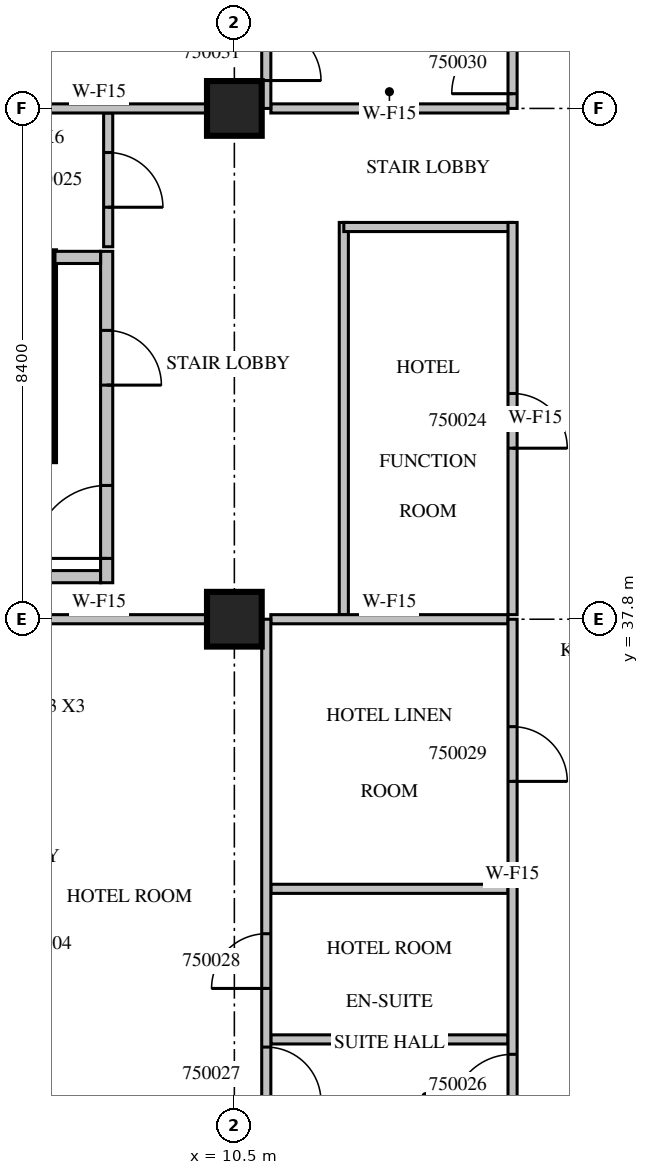
"""IFC4 building model, lengths in metres.
Left out: names, types, materials, properties, quantities, classifications, styles, units other than length and angle.
Written with IfcOpenShell. Run it as: python <this file> out.ifc"""

import sys

from ifc_helpers import new_model, si_unit, direction, frame, frame_2d, origin, origin_2d, place, context, subcontext, project, spatial, rectangle, extrude, source, transform, mapped, element, fill, save


model = new_model("IFC4")
c1 = context("Model", 3, precision=1e-05, world=origin(), true_north=direction((0.0, 1.0)))
c2 = subcontext(c1, "Body", "Model", "MODEL_VIEW")
j1 = project(units=[si_unit("LENGTHUNIT", "METRE"), si_unit("PLANEANGLEUNIT", "RADIAN")], contexts=[c1])
p1 = place(None, origin())
s1 = spatial("IfcSite", under=j1, at=p1, CompositionType="ELEMENT")
p2 = place(p1, origin())
s2 = spatial("IfcBuilding", under=s1, at=p2, CompositionType="ELEMENT")
p3 = place(p2, frame((0.0, 0.0, 223.4)))
s3 = spatial("IfcBuildingStorey", under=s2, at=p3, CompositionType="ELEMENT", Elevation=223.4)
m1 = source(origin(), c2, "Body", "SweptSolid", [
    extrude(rectangle(XDim=0.9, YDim=0.9, at=origin_2d()), origin(), (0.0, 0.0, 1.0), 3.8),
])
for number, where, z_axis, x_axis in (
    (1, (10.5, 37.8, 0.0), (0.0, 0.0, 1.0), (1.0, 0.0, 0.0)),
    (2, (10.5, 46.2, 0.0), (0.0, 0.0, 1.0), (1.0, 0.0, 0.0)),
):
    element("IfcColumn", number, at=place(p3, frame(where, z_axis=z_axis, x_axis=x_axis)), inside=s3, PredefinedType="COLUMN", context=c2, shape_type="MappedRepresentation", body=[
        mapped(m1, transform((0.0, 0.0, 0.0), scale=1.0)),
    ])
m2 = source(origin(), c2, "Body", "SweptSolid", [
    extrude(rectangle(XDim=3.45, YDim=0.25, at=frame_2d((1.725, 0.0))), origin(), (0.0, 0.0, 1.0), 3.4),
])
p4 = place(p3, frame((7.425, 40.4, 0.0), z_axis=(0.0, 0.0, 1.0), x_axis=(0.0, 1.0, 0.0)))
e3 = element("IfcWall", 3, at=p4, inside=s3, PredefinedType="SOLIDWALL", context=c2, shape_type="MappedRepresentation", body=[
    mapped(m2, transform((0.0, 0.0, 0.0), scale=1.0)),
])
m3 = source(origin(), c2, "Body", "SweptSolid", [
    extrude(rectangle(XDim=2.0, YDim=0.2, at=frame_2d((1.0, 0.0))), origin(), (0.0, 0.0, 1.0), 3.4),
])
p5 = place(p3, frame((6.3, 38.5, 0.0), z_axis=(0.0, 0.0, 1.0), x_axis=(1.0, 0.0, 0.0)))
e4 = element("IfcWall", 4, at=p5, inside=s3, PredefinedType="PARTITIONING", context=c2, shape_type="MappedRepresentation", body=[
    mapped(m3, transform((0.0, 0.0, 0.0), scale=1.0)),
])
m4 = source(origin(), c2, "Body", "SweptSolid", [
    extrude(rectangle(XDim=5.45, YDim=0.2, at=frame_2d((2.725, 0.0))), origin(), (0.0, 0.0, 1.0), 3.4),
])
p6 = place(p3, frame((8.4, 38.4, 0.0), z_axis=(0.0, 0.0, 1.0), x_axis=(0.0, 1.0, 0.0)))
e5 = element("IfcWall", 5, at=p6, inside=s3, PredefinedType="PARTITIONING", context=c2, shape_type="MappedRepresentation", body=[
    mapped(m4, transform((0.0, 0.0, 0.0), scale=1.0)),
])
m5 = source(origin(), c2, "Body", "SweptSolid", [
    extrude(rectangle(XDim=1.2, YDim=2.1, at=frame_2d((0.6, 1.05))), frame((0.0, 0.11, 0.0), z_axis=(0.0, -1.0, 0.0), x_axis=(1.0, 0.0, 0.0)), (0.0, 0.0, 1.0), 0.22),
])
p7 = place(p6, frame((0.4, 0.0, 0.0)))
e6 = element("IfcOpeningElement", 6, at=p7, cuts=e5, PredefinedType="OPENING", context=c2, shape_type="MappedRepresentation", body=[
    mapped(m5, transform((0.0, 0.0, 0.0), scale=1.0)),
])
m6 = source(origin(), c2, "Body", "SweptSolid", [
    extrude(rectangle(XDim=0.9, YDim=2.1, at=frame_2d((0.45, 1.05))), frame((0.0, 0.11, 0.0), z_axis=(0.0, -1.0, 0.0), x_axis=(1.0, 0.0, 0.0)), (0.0, 0.0, 1.0), 0.22),
])
p8 = place(p6, frame((3.25, 0.0, 0.0)))
e7 = element("IfcOpeningElement", 7, at=p8, cuts=e5, PredefinedType="OPENING", context=c2, shape_type="MappedRepresentation", body=[
    mapped(m6, transform((0.0, 0.0, 0.0), scale=1.0)),
])
m7 = source(origin(), c2, "Body", "SweptSolid", [
    extrude(rectangle(XDim=0.75, YDim=0.2, at=frame_2d((0.375, 0.0))), origin(), (0.0, 0.0, 1.0), 3.4),
])
p9 = place(p3, frame((7.55, 43.75, 0.0), z_axis=(0.0, 0.0, 1.0), x_axis=(1.0, 0.0, 0.0)))
e8 = element("IfcWall", 8, at=p9, inside=s3, PredefinedType="PARTITIONING", context=c2, shape_type="MappedRepresentation", body=[
    mapped(m7, transform((0.0, 0.0, 0.0), scale=1.0)),
])
m8 = source(origin(), c2, "Body", "SweptSolid", [
    extrude(rectangle(XDim=6.45, YDim=0.15, at=frame_2d((3.225, 0.0))), origin(), (0.0, 0.0, 1.0), 3.4),
])
p10 = place(p3, frame((12.3, 44.325, 0.0), z_axis=(0.0, 0.0, 1.0), x_axis=(0.0, -1.0, 0.0)))
e9 = element("IfcWall", 9, at=p10, inside=s3, PredefinedType="PARTITIONING", context=c2, shape_type="MappedRepresentation", body=[
    mapped(m8, transform((0.0, 0.0, 0.0), scale=1.0)),
])
m9 = source(origin(), c2, "Body", "SweptSolid", [
    extrude(rectangle(XDim=2.775, YDim=0.15, at=frame_2d((1.387, 0.0))), origin(), (0.0, 0.0, 1.0), 3.4),
])
p11 = place(p3, frame((15.075, 44.25, 0.0), z_axis=(0.0, 0.0, 1.0), x_axis=(-1.0, 0.0, 0.0)))
e10 = element("IfcWall", 10, at=p11, inside=s3, PredefinedType="PARTITIONING", context=c2, shape_type="MappedRepresentation", body=[
    mapped(m9, transform((0.0, 0.0, 0.0), scale=1.0)),
])
p12 = place(p3, frame((15.075, 37.875, 0.0), z_axis=(0.0, 0.0, 1.0), x_axis=(0.0, 1.0, 0.0)))
e11 = element("IfcWall", 11, at=p12, inside=s3, PredefinedType="PARTITIONING", context=c2, shape_type="MappedRepresentation", body=[
    mapped(m8, transform((0.0, 0.0, 0.0), scale=1.0)),
])
m10 = source(origin(), c2, "Body", "SweptSolid", [
    extrude(rectangle(XDim=0.9, YDim=2.1, at=frame_2d((0.45, 1.05))), frame((0.0, 0.085, 0.0), z_axis=(0.0, -1.0, 0.0), x_axis=(1.0, 0.0, 0.0)), (0.0, 0.0, 1.0), 0.17),
])
p13 = place(p12, frame((2.737, 0.0, 0.0)))
e12 = element("IfcOpeningElement", 12, at=p13, cuts=e11, PredefinedType="OPENING", context=c2, shape_type="MappedRepresentation", body=[
    mapped(m10, transform((0.0, 0.0, 0.0), scale=1.0)),
])
m11 = source(origin(), c2, "Body", "SweptSolid", [
    extrude(rectangle(XDim=2.2, YDim=0.15, at=frame_2d((1.1, 0.0))), origin(), (0.0, 0.0, 1.0), 3.4),
])
p14 = place(p3, frame((8.425, 43.925, 0.0), z_axis=(0.0, 0.0, 1.0), x_axis=(0.0, 1.0, 0.0)))
e13 = element("IfcWall", 13, at=p14, inside=s3, PredefinedType="PARTITIONING", context=c2, shape_type="MappedRepresentation", body=[
    mapped(m11, transform((0.0, 0.0, 0.0), scale=1.0)),
])
p15 = place(p14, frame((0.65, 0.0, 0.0)))
e14 = element("IfcOpeningElement", 14, at=p15, cuts=e13, PredefinedType="OPENING", context=c2, shape_type="MappedRepresentation", body=[
    mapped(m10, transform((0.0, 0.0, 0.0), scale=1.0)),
])
m12 = source(origin(), c2, "Body", "SweptSolid", [
    extrude(rectangle(XDim=3.9, YDim=0.15, at=frame_2d((1.95, 0.0))), origin(), (0.0, 0.0, 1.0), 3.4),
])
for number, where, z_axis, x_axis in (
    (15, (15.0, 30.89, 0.0), (0.0, 0.0, 1.0), (-1.0, 0.0, 0.0)),
    (16, (15.0, 33.367, 0.0), (0.0, 0.0, 1.0), (-1.0, 0.0, 0.0)),
):
    element("IfcWall", number, at=place(p3, frame(where, z_axis=z_axis, x_axis=x_axis)), inside=s3, PredefinedType="PARTITIONING", context=c2, shape_type="MappedRepresentation", body=[
        mapped(m12, transform((0.0, 0.0, 0.0), scale=1.0)),
    ])
m13 = source(origin(), c2, "Body", "SweptSolid", [
    extrude(rectangle(XDim=3.546, YDim=0.15, at=frame_2d((1.773, 0.0))), origin(), (0.0, 0.0, 1.0), 3.4),
])
p16 = place(p3, frame((10.051, 37.8, 0.0), z_axis=(0.0, 0.0, 1.0), x_axis=(-1.0, 0.0, 0.0)))
e17 = element("IfcWall", 17, at=p16, inside=s3, PredefinedType="PARTITIONING", context=c2, shape_type="MappedRepresentation", body=[
    mapped(m13, transform((0.0, 0.0, 0.0), scale=1.0)),
])
p17 = place(p3, frame((15.0, 37.8, 0.0), z_axis=(0.0, 0.0, 1.0), x_axis=(-1.0, 0.0, 0.0)))
e18 = element("IfcWall", 18, at=p17, inside=s3, PredefinedType="PARTITIONING", context=c2, shape_type="MappedRepresentation", body=[
    mapped(m12, transform((0.0, 0.0, 0.0), scale=1.0)),
])
m14 = source(origin(), c2, "Body", "SweptSolid", [
    extrude(rectangle(XDim=8.4, YDim=0.15, at=frame_2d((4.2, 0.0))), origin(), (0.0, 0.0, 1.0), 3.4),
])
p18 = place(p3, frame((11.025, 29.4, 0.0), z_axis=(0.0, 0.0, 1.0), x_axis=(0.0, 1.0, 0.0)))
e19 = element("IfcWall", 19, at=p18, inside=s3, PredefinedType="PARTITIONING", context=c2, shape_type="MappedRepresentation", body=[
    mapped(m14, transform((0.0, 0.0, 0.0), scale=1.0)),
])
p19 = place(p18, frame((0.464, 0.0, 0.0)))
e20 = element("IfcOpeningElement", 20, at=p19, cuts=e19, PredefinedType="OPENING", context=c2, shape_type="MappedRepresentation", body=[
    mapped(m10, transform((0.0, 0.0, 0.0), scale=1.0)),
])
p20 = place(p18, frame((2.328, 0.0, 0.0)))
e21 = element("IfcOpeningElement", 21, at=p20, cuts=e19, PredefinedType="OPENING", context=c2, shape_type="MappedRepresentation", body=[
    mapped(m10, transform((0.0, 0.0, 0.0), scale=1.0)),
])
p21 = place(p3, frame((10.051, 46.2, 0.0), z_axis=(0.0, 0.0, 1.0), x_axis=(-1.0, 0.0, 0.0)))
e22 = element("IfcWall", 22, at=p21, inside=s3, PredefinedType="PARTITIONING", context=c2, shape_type="MappedRepresentation", body=[
    mapped(m13, transform((0.0, 0.0, 0.0), scale=1.0)),
])
p22 = place(p3, frame((15.0, 46.2, 0.0), z_axis=(0.0, 0.0, 1.0), x_axis=(-1.0, 0.0, 0.0)))
e23 = element("IfcWall", 23, at=p22, inside=s3, PredefinedType="PARTITIONING", context=c2, shape_type="MappedRepresentation", body=[
    mapped(m12, transform((0.0, 0.0, 0.0), scale=1.0)),
])
m15 = source(origin(), c2, "Body", "SweptSolid", [
    extrude(rectangle(XDim=7.26, YDim=0.15, at=frame_2d((3.63, 0.0))), origin(), (0.0, 0.0, 1.0), 3.4),
])
p23 = place(p3, frame((11.025, 46.2, 0.0), z_axis=(0.0, 0.0, 1.0), x_axis=(0.0, 1.0, 0.0)))
e24 = element("IfcWall", 24, at=p23, inside=s3, PredefinedType="PARTITIONING", context=c2, shape_type="MappedRepresentation", body=[
    mapped(m15, transform((0.0, 0.0, 0.0), scale=1.0)),
])
p24 = place(p23, frame((0.459, 0.0, 0.0)))
e25 = element("IfcOpeningElement", 25, at=p24, cuts=e24, PredefinedType="OPENING", context=c2, shape_type="MappedRepresentation", body=[
    mapped(m10, transform((0.0, 0.0, 0.0), scale=1.0)),
])
p25 = place(p23, frame((1.95, 0.0, 0.0)))
e26 = element("IfcOpeningElement", 26, at=p25, cuts=e24, PredefinedType="OPENING", context=c2, shape_type="MappedRepresentation", body=[
    mapped(m10, transform((0.0, 0.0, 0.0), scale=1.0)),
])
p26 = place(p3, frame((15.075, 29.4, 0.0), z_axis=(0.0, 0.0, 1.0), x_axis=(0.0, 1.0, 0.0)))
e27 = element("IfcWall", 27, at=p26, inside=s3, PredefinedType="PARTITIONING", context=c2, shape_type="MappedRepresentation", body=[
    mapped(m14, transform((0.0, 0.0, 0.0), scale=1.0)),
])
m16 = source(origin(), c2, "Body", "SweptSolid", [
    extrude(rectangle(XDim=1.0, YDim=2.1, at=frame_2d((0.5, 1.05))), frame((0.0, 0.085, 0.0), z_axis=(0.0, -1.0, 0.0), x_axis=(1.0, 0.0, 0.0)), (0.0, 0.0, 1.0), 0.17),
])
p27 = place(p26, frame((0.245, 0.0, 0.0)))
e28 = element("IfcOpeningElement", 28, at=p27, cuts=e27, PredefinedType="OPENING", context=c2, shape_type="MappedRepresentation", body=[
    mapped(m16, transform((0.0, 0.0, 0.0), scale=1.0)),
])
p28 = place(p26, frame((5.733, 0.0, 0.0)))
e29 = element("IfcOpeningElement", 29, at=p28, cuts=e27, PredefinedType="OPENING", context=c2, shape_type="MappedRepresentation", body=[
    mapped(m10, transform((0.0, 0.0, 0.0), scale=1.0)),
])
p29 = place(p3, frame((15.075, 46.2, 0.0), z_axis=(0.0, 0.0, 1.0), x_axis=(0.0, 1.0, 0.0)))
e30 = element("IfcWall", 30, at=p29, inside=s3, PredefinedType="PARTITIONING", context=c2, shape_type="MappedRepresentation", body=[
    mapped(m15, transform((0.0, 0.0, 0.0), scale=1.0)),
])
p30 = place(p29, frame((0.242, 0.0, 0.0)))
e31 = element("IfcOpeningElement", 31, at=p30, cuts=e30, PredefinedType="OPENING", context=c2, shape_type="MappedRepresentation", body=[
    mapped(m16, transform((0.0, 0.0, 0.0), scale=1.0)),
])
p31 = place(p29, frame((4.825, 0.0, 0.0)))
e32 = element("IfcOpeningElement", 32, at=p31, cuts=e30, PredefinedType="OPENING", context=c2, shape_type="MappedRepresentation", body=[
    mapped(m10, transform((0.0, 0.0, 0.0), scale=1.0)),
])
m17 = source(origin(), c2, "Body", "SweptSolid", [
    extrude(rectangle(XDim=1.2, YDim=2.1, at=frame_2d((0.6, 1.05))), frame((0.0, 0.025, 0.0), z_axis=(0.0, -1.0, 0.0), x_axis=(1.0, 0.0, 0.0)), (0.0, 0.0, 1.0), 0.05),
])
p32 = place(p7, origin())
e33 = element("IfcDoor", 33, at=p32, inside=s3, OperationType="SINGLE_SWING_LEFT", PredefinedType="DOOR", context=c2, shape_type="MappedRepresentation", body=[
    mapped(m17, transform((0.0, 0.0, 0.0), scale=1.0)),
])
fill(e6, e33)
m18 = source(origin(), c2, "Body", "SweptSolid", [
    extrude(rectangle(XDim=0.9, YDim=2.1, at=frame_2d((0.45, 1.05))), frame((0.0, 0.025, 0.0), z_axis=(0.0, -1.0, 0.0), x_axis=(1.0, 0.0, 0.0)), (0.0, 0.0, 1.0), 0.05),
])
p33 = place(p8, origin())
e34 = element("IfcDoor", 34, at=p33, inside=s3, OperationType="SINGLE_SWING_RIGHT", PredefinedType="DOOR", context=c2, shape_type="MappedRepresentation", body=[
    mapped(m18, transform((0.0, 0.0, 0.0), scale=1.0)),
])
fill(e7, e34)
p34 = place(p13, origin())
e35 = element("IfcDoor", 35, at=p34, inside=s3, OperationType="SINGLE_SWING_RIGHT", PredefinedType="DOOR", context=c2, shape_type="MappedRepresentation", body=[
    mapped(m18, transform((0.0, 0.0, 0.0), scale=1.0)),
])
fill(e12, e35)
p35 = place(p15, origin())
e36 = element("IfcDoor", 36, at=p35, inside=s3, OperationType="SINGLE_SWING_RIGHT", PredefinedType="DOOR", context=c2, shape_type="MappedRepresentation", body=[
    mapped(m18, transform((0.0, 0.0, 0.0), scale=1.0)),
])
fill(e14, e36)
m19 = source(origin(), c2, "Body", "SweptSolid", [
    extrude(rectangle(XDim=1.0, YDim=2.1, at=frame_2d((0.5, 1.05))), frame((0.0, 0.025, 0.0), z_axis=(0.0, -1.0, 0.0), x_axis=(1.0, 0.0, 0.0)), (0.0, 0.0, 1.0), 0.05),
])
p36 = place(p27, origin())
e37 = element("IfcDoor", 37, at=p36, inside=s3, OperationType="SINGLE_SWING_LEFT", PredefinedType="DOOR", context=c2, shape_type="MappedRepresentation", body=[
    mapped(m19, transform((0.0, 0.0, 0.0), scale=1.0)),
])
fill(e28, e37)
p37 = place(p19, origin())
e38 = element("IfcDoor", 38, at=p37, inside=s3, OperationType="SINGLE_SWING_RIGHT", PredefinedType="DOOR", context=c2, shape_type="MappedRepresentation", body=[
    mapped(m18, transform((0.0, 0.0, 0.0), scale=1.0)),
])
fill(e20, e38)
p38 = place(p20, origin())
e39 = element("IfcDoor", 39, at=p38, inside=s3, OperationType="SINGLE_SWING_LEFT", PredefinedType="DOOR", context=c2, shape_type="MappedRepresentation", body=[
    mapped(m18, transform((0.0, 0.0, 0.0), scale=1.0)),
])
fill(e21, e39)
p39 = place(p28, origin())
e40 = element("IfcDoor", 40, at=p39, inside=s3, OperationType="SINGLE_SWING_RIGHT", PredefinedType="DOOR", context=c2, shape_type="MappedRepresentation", body=[
    mapped(m18, transform((0.0, 0.0, 0.0), scale=1.0)),
])
fill(e29, e40)
p40 = place(p30, origin())
e41 = element("IfcDoor", 41, at=p40, inside=s3, OperationType="SINGLE_SWING_LEFT", PredefinedType="DOOR", context=c2, shape_type="MappedRepresentation", body=[
    mapped(m19, transform((0.0, 0.0, 0.0), scale=1.0)),
])
fill(e31, e41)
p41 = place(p24, origin())
e42 = element("IfcDoor", 42, at=p41, inside=s3, OperationType="SINGLE_SWING_RIGHT", PredefinedType="DOOR", context=c2, shape_type="MappedRepresentation", body=[
    mapped(m18, transform((0.0, 0.0, 0.0), scale=1.0)),
])
fill(e25, e42)
save(model, sys.argv[1])
